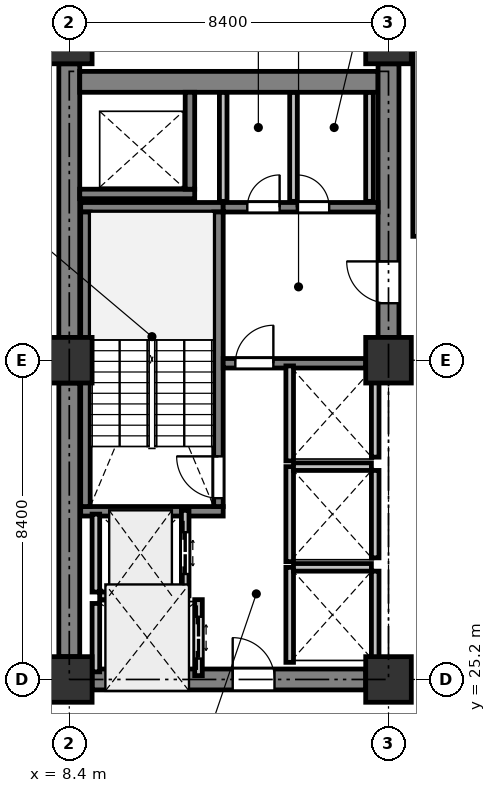
"""IFC4 building model, lengths in metres.
Left out: names, types, materials, properties, quantities, classifications, styles, units other than length and angle.
Written with IfcOpenShell. Run it as: python <this file> out.ifc"""

import sys

from ifc_helpers import new_model, si_unit, direction, frame, frame_2d, origin, origin_2d, place, context, subcontext, project, spatial, rectangle, extrude, element, fill, save


model = new_model("IFC4")
c1 = context("Model", 3, precision=1e-05, world=origin(), true_north=direction((0.0, 1.0)))
c2 = subcontext(c1, "Body", "Model", "MODEL_VIEW")
j1 = project(units=[si_unit("LENGTHUNIT", "METRE"), si_unit("PLANEANGLEUNIT", "RADIAN")], contexts=[c1])
p1 = place(None, origin())
s1 = spatial("IfcSite", under=j1, at=p1, CompositionType="ELEMENT")
p2 = place(p1, origin())
s2 = spatial("IfcBuilding", under=s1, at=p2, CompositionType="ELEMENT")
p3 = place(p2, frame((0.0, 0.0, 117.2)))
s3 = spatial("IfcBuildingStorey", under=s2, at=p3, CompositionType="ELEMENT", Elevation=117.2)
for number, where, z_axis, x_axis in (
    (1, (8.4, 25.2, 0.0), (0.0, 0.0, 1.0), (1.0, 0.0, 0.0)),
    (2, (8.4, 33.6, 0.0), (0.0, 0.0, 1.0), (1.0, 0.0, 0.0)),
    (3, (8.4, 42.0, 0.0), (0.0, 0.0, 1.0), (1.0, 0.0, 0.0)),
    (4, (16.8, 25.2, 0.0), (0.0, 0.0, 1.0), (1.0, 0.0, 0.0)),
    (5, (16.8, 33.6, 0.0), (0.0, 0.0, 1.0), (1.0, 0.0, 0.0)),
    (6, (16.8, 42.0, 0.0), (0.0, 0.0, 1.0), (1.0, 0.0, 0.0)),
):
    element("IfcColumn", number, at=place(p3, frame(where, z_axis=z_axis, x_axis=x_axis)), inside=s3, PredefinedType="COLUMN", context=c2, shape_type="SweptSolid", body=[
        extrude(rectangle(XDim=1.2, YDim=1.2, at=origin_2d()), origin(), (0.0, 0.0, 1.0), 4.1),
    ])
for number, where, z_axis, x_axis in (
    (7, (8.4, 25.8, 0.0), (0.0, 0.0, 1.0), (0.0, 1.0, 0.0)),
    (8, (8.4, 34.2, 0.0), (0.0, 0.0, 1.0), (0.0, 1.0, 0.0)),
):
    element("IfcWall", number, at=place(p3, frame(where, z_axis=z_axis, x_axis=x_axis)), inside=s3, PredefinedType="SHEAR", context=c2, shape_type="SweptSolid", body=[
        extrude(rectangle(XDim=7.2, YDim=0.55, at=frame_2d((3.6, 0.0))), origin(), (0.0, 0.0, 1.0), 3.825),
    ])
p4 = place(p3, frame((8.675, 40.925, 0.0), z_axis=(0.0, 0.0, 1.0), x_axis=(1.0, 0.0, 0.0)))
e9 = element("IfcWall", 9, at=p4, inside=s3, PredefinedType="SHEAR", context=c2, shape_type="SweptSolid", body=[
    extrude(rectangle(XDim=7.85, YDim=0.55, at=frame_2d((3.925, 0.0))), origin(), (0.0, 0.0, 1.0), 3.825),
])
p5 = place(p3, frame((16.8, 34.2, 0.0), z_axis=(0.0, 0.0, 1.0), x_axis=(0.0, 1.0, 0.0)))
e10 = element("IfcWall", 10, at=p5, inside=s3, PredefinedType="SHEAR", context=c2, shape_type="SweptSolid", body=[
    extrude(rectangle(XDim=7.2, YDim=0.55, at=frame_2d((3.6, 0.0))), origin(), (0.0, 0.0, 1.0), 3.825),
])
p6 = place(p5, frame((0.9, 0.0, 0.0)))
e11 = element("IfcOpeningElement", 11, at=p6, cuts=e10, PredefinedType="OPENING", context=c2, shape_type="SweptSolid", body=[
    extrude(rectangle(XDim=1.1, YDim=2.15, at=frame_2d((0.55, 1.075))), frame((0.0, 0.285, 0.0), z_axis=(0.0, -1.0, 0.0), x_axis=(1.0, 0.0, 0.0)), (0.0, 0.0, 1.0), 0.57),
])
p7 = place(p3, frame((9.0, 25.2, 0.0), z_axis=(0.0, 0.0, 1.0), x_axis=(1.0, 0.0, 0.0)))
e12 = element("IfcWall", 12, at=p7, inside=s3, PredefinedType="SHEAR", context=c2, shape_type="SweptSolid", body=[
    extrude(rectangle(XDim=7.2, YDim=0.55, at=frame_2d((3.6, 0.0))), origin(), (0.0, 0.0, 1.0), 3.825),
])
p8 = place(p7, frame((3.7, 0.0, 0.0)))
e13 = element("IfcOpeningElement", 13, at=p8, cuts=e12, PredefinedType="OPENING", context=c2, shape_type="SweptSolid", body=[
    extrude(rectangle(XDim=1.1, YDim=2.15, at=frame_2d((0.55, 1.075))), frame((0.0, 0.285, 0.0), z_axis=(0.0, -1.0, 0.0), x_axis=(1.0, 0.0, 0.0)), (0.0, 0.0, 1.0), 0.57),
])
for number, where, z_axis, x_axis in (
    (14, (12.45, 29.625, 0.0), (0.0, 0.0, 1.0), (-1.0, 0.0, 0.0)),
    (15, (12.45, 37.625, 0.0), (0.0, 0.0, 1.0), (-1.0, 0.0, 0.0)),
):
    element("IfcWall", number, at=place(p3, frame(where, z_axis=z_axis, x_axis=x_axis)), inside=s3, PredefinedType="SHEAR", context=c2, shape_type="SweptSolid", body=[
        extrude(rectangle(XDim=3.75, YDim=0.25, at=frame_2d((1.875, 0.0))), origin(), (0.0, 0.0, 1.0), 3.825),
    ])
p9 = place(p3, frame((12.325, 29.75, 0.0), z_axis=(0.0, 0.0, 1.0), x_axis=(0.0, 1.0, 0.0)))
e16 = element("IfcWall", 16, at=p9, inside=s3, PredefinedType="SHEAR", context=c2, shape_type="SweptSolid", body=[
    extrude(rectangle(XDim=7.75, YDim=0.25, at=frame_2d((3.875, 0.0))), origin(), (0.0, 0.0, 1.0), 3.825),
])
p10 = place(p9, frame((0.22, 0.0, 0.0)))
e17 = element("IfcOpeningElement", 17, at=p10, cuts=e16, PredefinedType="OPENING", context=c2, shape_type="SweptSolid", body=[
    extrude(rectangle(XDim=1.1, YDim=2.15, at=frame_2d((0.55, 1.075))), frame((0.0, 0.135, 0.0), z_axis=(0.0, -1.0, 0.0), x_axis=(1.0, 0.0, 0.0)), (0.0, 0.0, 1.0), 0.27),
])
p11 = place(p3, frame((8.825, 29.75, 0.0), z_axis=(0.0, 0.0, 1.0), x_axis=(0.0, 1.0, 0.0)))
e18 = element("IfcWall", 18, at=p11, inside=s3, PredefinedType="SHEAR", context=c2, shape_type="SweptSolid", body=[
    extrude(rectangle(XDim=7.75, YDim=0.25, at=frame_2d((3.875, 0.0))), origin(), (0.0, 0.0, 1.0), 3.825),
])
p12 = place(p3, frame((8.675, 37.975, 0.0), z_axis=(0.0, 0.0, 1.0), x_axis=(1.0, 0.0, 0.0)))
e19 = element("IfcWall", 19, at=p12, inside=s3, PredefinedType="SHEAR", context=c2, shape_type="SweptSolid", body=[
    extrude(rectangle(XDim=3.025, YDim=0.25, at=frame_2d((1.512, 0.0))), origin(), (0.0, 0.0, 1.0), 3.825),
])
p13 = place(p3, frame((11.575, 38.1, 0.0), z_axis=(0.0, 0.0, 1.0), x_axis=(0.0, 1.0, 0.0)))
e20 = element("IfcWall", 20, at=p13, inside=s3, PredefinedType="SHEAR", context=c2, shape_type="SweptSolid", body=[
    extrude(rectangle(XDim=2.55, YDim=0.25, at=frame_2d((1.275, 0.0))), origin(), (0.0, 0.0, 1.0), 3.825),
])
p14 = place(p3, frame((12.45, 33.52, 0.0), z_axis=(0.0, 0.0, 1.0), x_axis=(1.0, 0.0, 0.0)))
e21 = element("IfcWall", 21, at=p14, inside=s3, PredefinedType="SHEAR", context=c2, shape_type="SweptSolid", body=[
    extrude(rectangle(XDim=3.75, YDim=0.25, at=frame_2d((1.875, 0.0))), origin(), (0.0, 0.0, 1.0), 3.825),
])
p15 = place(p14, frame((0.32, 0.0, 0.0)))
e22 = element("IfcOpeningElement", 22, at=p15, cuts=e21, PredefinedType="OPENING", context=c2, shape_type="SweptSolid", body=[
    extrude(rectangle(XDim=1.0, YDim=2.15, at=frame_2d((0.5, 1.075))), frame((0.0, 0.135, 0.0), z_axis=(0.0, -1.0, 0.0), x_axis=(1.0, 0.0, 0.0)), (0.0, 0.0, 1.0), 0.27),
])
p16 = place(p3, frame((12.45, 37.625, 0.0), z_axis=(0.0, 0.0, 1.0), x_axis=(1.0, 0.0, 0.0)))
e23 = element("IfcWall", 23, at=p16, inside=s3, PredefinedType="SHEAR", context=c2, shape_type="SweptSolid", body=[
    extrude(rectangle(XDim=4.075, YDim=0.25, at=frame_2d((2.038, 0.0))), origin(), (0.0, 0.0, 1.0), 3.825),
])
p17 = place(p16, frame((0.635, 0.0, 0.0)))
e24 = element("IfcOpeningElement", 24, at=p17, cuts=e23, PredefinedType="OPENING", context=c2, shape_type="SweptSolid", body=[
    extrude(rectangle(XDim=0.85, YDim=2.15, at=frame_2d((0.425, 1.075))), frame((0.0, 0.135, 0.0), z_axis=(0.0, -1.0, 0.0), x_axis=(1.0, 0.0, 0.0)), (0.0, 0.0, 1.0), 0.27),
])
p18 = place(p16, frame((1.938, 0.0, 0.0)))
e25 = element("IfcOpeningElement", 25, at=p18, cuts=e23, PredefinedType="OPENING", context=c2, shape_type="SweptSolid", body=[
    extrude(rectangle(XDim=0.85, YDim=2.15, at=frame_2d((0.425, 1.075))), frame((0.0, 0.135, 0.0), z_axis=(0.0, -1.0, 0.0), x_axis=(1.0, 0.0, 0.0)), (0.0, 0.0, 1.0), 0.27),
])
p19 = place(p3, frame((11.45, 27.4, 0.0), z_axis=(0.0, 0.0, 1.0), x_axis=(0.0, 1.0, 0.0)))
e26 = element("IfcWall", 26, at=p19, inside=s3, PredefinedType="PARTITIONING", context=c2, shape_type="SweptSolid", body=[
    extrude(rectangle(XDim=2.25, YDim=0.2, at=frame_2d((1.125, 0.0))), origin(), (0.0, 0.0, 1.0), 3.825),
])
p20 = place(p19, frame((0.575, 0.0, 0.0)))
e27 = element("IfcOpeningElement", 27, at=p20, cuts=e26, PredefinedType="OPENING", context=c2, shape_type="SweptSolid", body=[
    extrude(rectangle(XDim=1.1, YDim=2.2, at=frame_2d((0.55, 1.1))), frame((0.0, 0.11, 0.0), z_axis=(0.0, -1.0, 0.0), x_axis=(1.0, 0.0, 0.0)), (0.0, 0.0, 1.0), 0.22),
])
p21 = place(p3, frame((9.1, 27.5, 0.0), z_axis=(0.0, 0.0, 1.0), x_axis=(0.0, 1.0, 0.0)))
e28 = element("IfcWall", 28, at=p21, inside=s3, PredefinedType="PARTITIONING", context=c2, shape_type="SweptSolid", body=[
    extrude(rectangle(XDim=2.05, YDim=0.2, at=frame_2d((1.025, 0.0))), origin(), (0.0, 0.0, 1.0), 3.825),
])
p22 = place(p3, frame((9.2, 27.4, 0.0), z_axis=(0.0, 0.0, 1.0), x_axis=(1.0, 0.0, 0.0)))
e29 = element("IfcWall", 29, at=p22, inside=s3, PredefinedType="PARTITIONING", context=c2, shape_type="SweptSolid", body=[
    extrude(rectangle(XDim=2.15, YDim=0.2, at=frame_2d((1.075, 0.0))), origin(), (0.0, 0.0, 1.0), 3.825),
])
p23 = place(p3, frame((11.8, 25.3, 0.0), z_axis=(0.0, 0.0, 1.0), x_axis=(0.0, 1.0, 0.0)))
e30 = element("IfcWall", 30, at=p23, inside=s3, PredefinedType="PARTITIONING", context=c2, shape_type="SweptSolid", body=[
    extrude(rectangle(XDim=2.0, YDim=0.2, at=frame_2d((1.0, 0.0))), origin(), (0.0, 0.0, 1.0), 3.825),
])
p24 = place(p23, frame((0.45, 0.0, 0.0)))
e31 = element("IfcOpeningElement", 31, at=p24, cuts=e30, PredefinedType="OPENING", context=c2, shape_type="SweptSolid", body=[
    extrude(rectangle(XDim=1.1, YDim=2.2, at=frame_2d((0.55, 1.1))), frame((0.0, 0.11, 0.0), z_axis=(0.0, -1.0, 0.0), x_axis=(1.0, 0.0, 0.0)), (0.0, 0.0, 1.0), 0.22),
])
p25 = place(p3, frame((9.1, 25.4, 0.0), z_axis=(0.0, 0.0, 1.0), x_axis=(0.0, 1.0, 0.0)))
e32 = element("IfcWall", 32, at=p25, inside=s3, PredefinedType="PARTITIONING", context=c2, shape_type="SweptSolid", body=[
    extrude(rectangle(XDim=1.8, YDim=0.2, at=frame_2d((0.9, 0.0))), origin(), (0.0, 0.0, 1.0), 3.825),
])
p26 = place(p3, frame((14.2, 25.65, 0.0), z_axis=(0.0, 0.0, 1.0), x_axis=(0.0, 1.0, 0.0)))
e33 = element("IfcWall", 33, at=p26, inside=s3, PredefinedType="PARTITIONING", context=c2, shape_type="SweptSolid", body=[
    extrude(rectangle(XDim=2.5, YDim=0.2, at=frame_2d((1.25, 0.0))), origin(), (0.0, 0.0, 1.0), 3.825),
])
p27 = place(p3, frame((16.45, 25.75, 0.0), z_axis=(0.0, 0.0, 1.0), x_axis=(0.0, 1.0, 0.0)))
e34 = element("IfcWall", 34, at=p27, inside=s3, PredefinedType="PARTITIONING", context=c2, shape_type="SweptSolid", body=[
    extrude(rectangle(XDim=2.3, YDim=0.2, at=frame_2d((1.15, 0.0))), origin(), (0.0, 0.0, 1.0), 3.825),
])
p28 = place(p3, frame((14.3, 28.15, 0.0), z_axis=(0.0, 0.0, 1.0), x_axis=(1.0, 0.0, 0.0)))
e35 = element("IfcWall", 35, at=p28, inside=s3, PredefinedType="PARTITIONING", context=c2, shape_type="SweptSolid", body=[
    extrude(rectangle(XDim=2.05, YDim=0.2, at=frame_2d((1.025, 0.0))), origin(), (0.0, 0.0, 1.0), 3.825),
])
p29 = place(p3, frame((14.2, 28.3, 0.0), z_axis=(0.0, 0.0, 1.0), x_axis=(0.0, 1.0, 0.0)))
e36 = element("IfcWall", 36, at=p29, inside=s3, PredefinedType="PARTITIONING", context=c2, shape_type="SweptSolid", body=[
    extrude(rectangle(XDim=2.5, YDim=0.2, at=frame_2d((1.25, 0.0))), origin(), (0.0, 0.0, 1.0), 3.825),
])
p30 = place(p3, frame((16.45, 28.4, 0.0), z_axis=(0.0, 0.0, 1.0), x_axis=(0.0, 1.0, 0.0)))
e37 = element("IfcWall", 37, at=p30, inside=s3, PredefinedType="PARTITIONING", context=c2, shape_type="SweptSolid", body=[
    extrude(rectangle(XDim=2.3, YDim=0.2, at=frame_2d((1.15, 0.0))), origin(), (0.0, 0.0, 1.0), 3.825),
])
p31 = place(p3, frame((14.3, 30.8, 0.0), z_axis=(0.0, 0.0, 1.0), x_axis=(1.0, 0.0, 0.0)))
e38 = element("IfcWall", 38, at=p31, inside=s3, PredefinedType="PARTITIONING", context=c2, shape_type="SweptSolid", body=[
    extrude(rectangle(XDim=2.05, YDim=0.2, at=frame_2d((1.025, 0.0))), origin(), (0.0, 0.0, 1.0), 3.825),
])
p32 = place(p3, frame((14.2, 30.95, 0.0), z_axis=(0.0, 0.0, 1.0), x_axis=(0.0, 1.0, 0.0)))
e39 = element("IfcWall", 39, at=p32, inside=s3, PredefinedType="PARTITIONING", context=c2, shape_type="SweptSolid", body=[
    extrude(rectangle(XDim=2.5, YDim=0.2, at=frame_2d((1.25, 0.0))), origin(), (0.0, 0.0, 1.0), 3.825),
])
p33 = place(p3, frame((16.45, 31.05, 0.0), z_axis=(0.0, 0.0, 1.0), x_axis=(0.0, 1.0, 0.0)))
e40 = element("IfcWall", 40, at=p33, inside=s3, PredefinedType="PARTITIONING", context=c2, shape_type="SweptSolid", body=[
    extrude(rectangle(XDim=2.3, YDim=0.2, at=frame_2d((1.15, 0.0))), origin(), (0.0, 0.0, 1.0), 3.825),
])
for number, where, z_axis, x_axis in (
    (41, (14.3, 37.78, 0.0), (0.0, 0.0, 1.0), (0.0, 1.0, 0.0)),
    (42, (12.45, 40.646, 0.0), (0.0, 0.0, 1.0), (0.0, -1.0, 0.0)),
    (43, (16.3, 37.78, 0.0), (0.0, 0.0, 1.0), (0.0, 1.0, 0.0)),
):
    element("IfcWall", number, at=place(p3, frame(where, z_axis=z_axis, x_axis=x_axis)), inside=s3, PredefinedType="PARTITIONING", context=c2, shape_type="SweptSolid", body=[
        extrude(rectangle(XDim=2.866, YDim=0.2, at=frame_2d((1.433, 0.0))), origin(), (0.0, 0.0, 1.0), 2.725),
    ])
p34 = place(p3, frame((17.54, 36.86, 0.0), z_axis=(0.0, 0.0, 1.0), x_axis=(0.0, 1.0, 0.0)))
e44 = element("IfcWall", 44, at=p34, inside=s3, PredefinedType="PARTITIONING", context=c2, shape_type="SweptSolid", body=[
    extrude(rectangle(XDim=8.34, YDim=0.2, at=frame_2d((4.17, 0.0))), origin(), (0.0, 0.0, 1.0), 3.292),
])
p35 = place(p6, origin())
e45 = element("IfcDoor", 45, at=p35, inside=s3, OperationType="SINGLE_SWING_RIGHT", PredefinedType="DOOR", context=c2, shape_type="SweptSolid", body=[
    extrude(rectangle(XDim=1.1, YDim=2.15, at=frame_2d((0.55, 1.075))), frame((0.0, 0.025, 0.0), z_axis=(0.0, -1.0, 0.0), x_axis=(1.0, 0.0, 0.0)), (0.0, 0.0, 1.0), 0.05),
])
fill(e11, e45)
p36 = place(p8, origin())
e46 = element("IfcDoor", 46, at=p36, inside=s3, OperationType="SINGLE_SWING_LEFT", PredefinedType="DOOR", context=c2, shape_type="SweptSolid", body=[
    extrude(rectangle(XDim=1.1, YDim=2.15, at=frame_2d((0.55, 1.075))), frame((0.0, 0.025, 0.0), z_axis=(0.0, -1.0, 0.0), x_axis=(1.0, 0.0, 0.0)), (0.0, 0.0, 1.0), 0.05),
])
fill(e13, e46)
p37 = place(p10, origin())
e47 = element("IfcDoor", 47, at=p37, inside=s3, OperationType="SINGLE_SWING_RIGHT", PredefinedType="DOOR", context=c2, shape_type="SweptSolid", body=[
    extrude(rectangle(XDim=1.1, YDim=2.15, at=frame_2d((0.55, 1.075))), frame((0.0, 0.025, 0.0), z_axis=(0.0, -1.0, 0.0), x_axis=(1.0, 0.0, 0.0)), (0.0, 0.0, 1.0), 0.05),
])
fill(e17, e47)
p38 = place(p15, origin())
e48 = element("IfcDoor", 48, at=p38, inside=s3, OperationType="SINGLE_SWING_RIGHT", PredefinedType="DOOR", context=c2, shape_type="SweptSolid", body=[
    extrude(rectangle(XDim=1.0, YDim=2.15, at=frame_2d((0.5, 1.075))), frame((0.0, 0.025, 0.0), z_axis=(0.0, -1.0, 0.0), x_axis=(1.0, 0.0, 0.0)), (0.0, 0.0, 1.0), 0.05),
])
fill(e22, e48)
p39 = place(p20, origin())
e49 = element("IfcDoor", 49, at=p39, inside=s3, OperationType="DOUBLE_DOOR_SLIDING", PredefinedType="DOOR", context=c2, shape_type="SweptSolid", body=[
    extrude(rectangle(XDim=1.1, YDim=2.2, at=frame_2d((0.55, 1.1))), frame((0.0, 0.025, 0.0), z_axis=(0.0, -1.0, 0.0), x_axis=(1.0, 0.0, 0.0)), (0.0, 0.0, 1.0), 0.05),
])
fill(e27, e49)
p40 = place(p24, origin())
e50 = element("IfcDoor", 50, at=p40, inside=s3, OperationType="DOUBLE_DOOR_SLIDING", PredefinedType="DOOR", context=c2, shape_type="SweptSolid", body=[
    extrude(rectangle(XDim=1.1, YDim=2.2, at=frame_2d((0.55, 1.1))), frame((0.0, 0.025, 0.0), z_axis=(0.0, -1.0, 0.0), x_axis=(1.0, 0.0, 0.0)), (0.0, 0.0, 1.0), 0.05),
])
fill(e31, e50)
p41 = place(p17, origin())
e51 = element("IfcDoor", 51, at=p41, inside=s3, OperationType="SINGLE_SWING_RIGHT", PredefinedType="DOOR", context=c2, shape_type="SweptSolid", body=[
    extrude(rectangle(XDim=0.85, YDim=2.15, at=frame_2d((0.425, 1.075))), frame((0.0, 0.025, 0.0), z_axis=(0.0, -1.0, 0.0), x_axis=(1.0, 0.0, 0.0)), (0.0, 0.0, 1.0), 0.05),
])
fill(e24, e51)
p42 = place(p18, origin())
e52 = element("IfcDoor", 52, at=p42, inside=s3, OperationType="SINGLE_SWING_LEFT", PredefinedType="DOOR", context=c2, shape_type="SweptSolid", body=[
    extrude(rectangle(XDim=0.85, YDim=2.15, at=frame_2d((0.425, 1.075))), frame((0.0, 0.025, 0.0), z_axis=(0.0, -1.0, 0.0), x_axis=(1.0, 0.0, 0.0)), (0.0, 0.0, 1.0), 0.05),
])
fill(e25, e52)
save(model, sys.argv[1])
